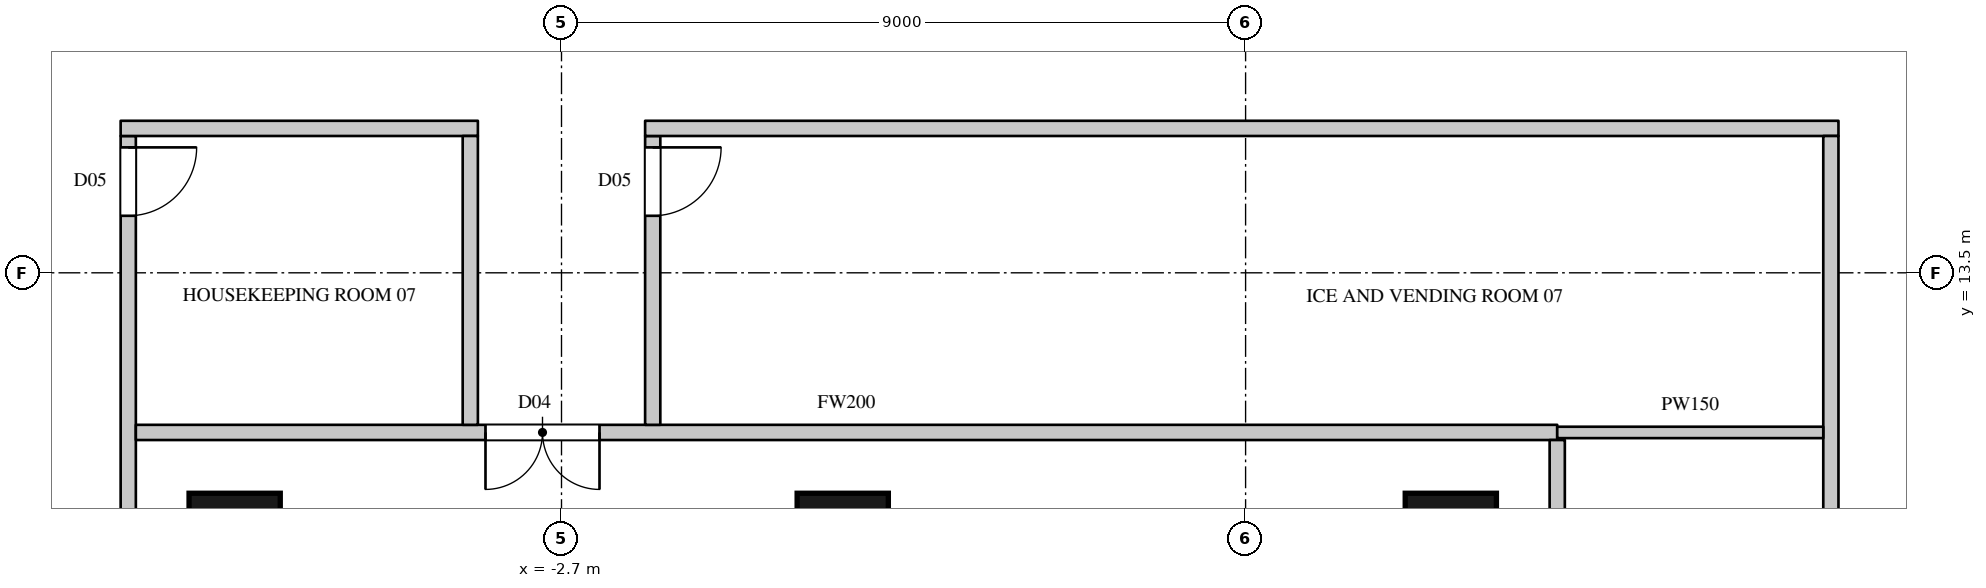
"""IFC4 building model, lengths in metres.
Left out: names, types, materials, properties, quantities, classifications, styles, units other than length and angle.
Written with IfcOpenShell. Run it as: python <this file> out.ifc"""

import sys

from ifc_helpers import new_model, si_unit, direction, frame, frame_2d, origin, origin_2d, place, context, subcontext, project, spatial, rectangle, circle, extrude, element, fill, save


model = new_model("IFC4")
c1 = context("Model", 3, precision=1e-05, world=origin(), true_north=direction((0.0, 1.0)))
c2 = subcontext(c1, "Body", "Model", "MODEL_VIEW")
j1 = project(units=[si_unit("LENGTHUNIT", "METRE"), si_unit("PLANEANGLEUNIT", "RADIAN")], contexts=[c1])
p1 = place(None, origin())
s1 = spatial("IfcSite", under=j1, at=p1, CompositionType="ELEMENT")
p2 = place(p1, origin())
s2 = spatial("IfcBuilding", under=s1, at=p2, CompositionType="ELEMENT")
p3 = place(p2, frame((0.0, 0.0, 55.5)))
s3 = spatial("IfcBuildingStorey", under=s2, at=p3, CompositionType="ELEMENT", Elevation=55.5)
for number, where, z_axis, x_axis in (
    (1, (-7.0, 10.0, 0.0), (0.0, 0.0, 1.0), (1.0, 0.0, 0.0)),
    (2, (1.0, 10.0, 0.0), (0.0, 0.0, 1.0), (1.0, 0.0, 0.0)),
    (3, (9.0, 10.0, 0.0), (0.0, 0.0, 1.0), (1.0, 0.0, 0.0)),
):
    element("IfcColumn", number, at=place(p3, frame(where, z_axis=z_axis, x_axis=x_axis)), inside=s3, PredefinedType="COLUMN", context=c2, shape_type="SweptSolid", body=[
        extrude(circle(Radius=0.6, at=origin_2d()), origin(), (0.0, 0.0, 1.0), 3.6),
    ])
p4 = place(p3, frame((-8.4, -15.3, 0.0), z_axis=(0.0, 0.0, 1.0), x_axis=(0.0, 1.0, 0.0)))
e4 = element("IfcWall", 4, at=p4, inside=s3, PredefinedType="PARTITIONING", context=c2, shape_type="SweptSolid", body=[
    extrude(rectangle(XDim=30.6, YDim=0.2, at=frame_2d((15.3, 0.0))), origin(), (0.0, 0.0, 1.0), 3.3),
])
p5 = place(p4, frame((19.05, 0.0, 0.0)))
e5 = element("IfcOpeningElement", 5, at=p5, cuts=e4, PredefinedType="OPENING", context=c2, shape_type="SweptSolid", body=[
    extrude(rectangle(XDim=1.5, YDim=2.2, at=frame_2d((0.75, 1.1))), frame((0.0, 0.11, 0.0), z_axis=(0.0, -1.0, 0.0), x_axis=(1.0, 0.0, 0.0)), (0.0, 0.0, 1.0), 0.22),
])
p6 = place(p4, frame((29.55, 0.0, 0.0)))
e6 = element("IfcOpeningElement", 6, at=p6, cuts=e4, PredefinedType="OPENING", context=c2, shape_type="SweptSolid", body=[
    extrude(rectangle(XDim=0.9, YDim=2.2, at=frame_2d((0.45, 1.1))), frame((0.0, 0.11, 0.0), z_axis=(0.0, -1.0, 0.0), x_axis=(1.0, 0.0, 0.0)), (0.0, 0.0, 1.0), 0.22),
])
p7 = place(p4, frame((0.15, 0.0, 0.0)))
e7 = element("IfcOpeningElement", 7, at=p7, cuts=e4, PredefinedType="OPENING", context=c2, shape_type="SweptSolid", body=[
    extrude(rectangle(XDim=0.9, YDim=2.2, at=frame_2d((0.45, 1.1))), frame((0.0, 0.11, 0.0), z_axis=(0.0, -1.0, 0.0), x_axis=(1.0, 0.0, 0.0)), (0.0, 0.0, 1.0), 0.22),
])
p8 = place(p3, frame((-8.3, 11.4, 0.0), z_axis=(0.0, 0.0, 1.0), x_axis=(1.0, 0.0, 0.0)))
e8 = element("IfcWall", 8, at=p8, inside=s3, PredefinedType="PARTITIONING", context=c2, shape_type="SweptSolid", body=[
    extrude(rectangle(XDim=18.7, YDim=0.2, at=frame_2d((9.35, 0.0))), origin(), (0.0, 0.0, 1.0), 3.3),
])
p9 = place(p8, frame((4.6, 0.0, 0.0)))
e9 = element("IfcOpeningElement", 9, at=p9, cuts=e8, PredefinedType="OPENING", context=c2, shape_type="SweptSolid", body=[
    extrude(rectangle(XDim=1.5, YDim=2.2, at=frame_2d((0.75, 1.1))), frame((0.0, 0.11, 0.0), z_axis=(0.0, -1.0, 0.0), x_axis=(1.0, 0.0, 0.0)), (0.0, 0.0, 1.0), 0.22),
])
p10 = place(p3, frame((-8.5, 15.4, 0.0), z_axis=(0.0, 0.0, 1.0), x_axis=(1.0, 0.0, 0.0)))
e10 = element("IfcWall", 10, at=p10, inside=s3, PredefinedType="PARTITIONING", context=c2, shape_type="SweptSolid", body=[
    extrude(rectangle(XDim=4.7, YDim=0.2, at=frame_2d((2.35, 0.0))), origin(), (0.0, 0.0, 1.0), 3.3),
])
p11 = place(p3, frame((-3.9, 11.5, 0.0), z_axis=(0.0, 0.0, 1.0), x_axis=(0.0, 1.0, 0.0)))
e11 = element("IfcWall", 11, at=p11, inside=s3, PredefinedType="PARTITIONING", context=c2, shape_type="SweptSolid", body=[
    extrude(rectangle(XDim=3.8, YDim=0.2, at=frame_2d((1.9, 0.0))), origin(), (0.0, 0.0, 1.0), 3.3),
])
p12 = place(p3, frame((-1.5, 11.5, 0.0), z_axis=(0.0, 0.0, 1.0), x_axis=(0.0, 1.0, 0.0)))
e12 = element("IfcWall", 12, at=p12, inside=s3, PredefinedType="PARTITIONING", context=c2, shape_type="SweptSolid", body=[
    extrude(rectangle(XDim=3.8, YDim=0.2, at=frame_2d((1.9, 0.0))), origin(), (0.0, 0.0, 1.0), 3.3),
])
p13 = place(p12, frame((2.75, 0.0, 0.0)))
e13 = element("IfcOpeningElement", 13, at=p13, cuts=e12, PredefinedType="OPENING", context=c2, shape_type="SweptSolid", body=[
    extrude(rectangle(XDim=0.9, YDim=2.2, at=frame_2d((0.45, 1.1))), frame((0.0, 0.11, 0.0), z_axis=(0.0, -1.0, 0.0), x_axis=(1.0, 0.0, 0.0)), (0.0, 0.0, 1.0), 0.22),
])
p14 = place(p3, frame((-1.6, 15.4, 0.0), z_axis=(0.0, 0.0, 1.0), x_axis=(1.0, 0.0, 0.0)))
e14 = element("IfcWall", 14, at=p14, inside=s3, PredefinedType="PARTITIONING", context=c2, shape_type="SweptSolid", body=[
    extrude(rectangle(XDim=15.7, YDim=0.2, at=frame_2d((7.85, 0.0))), origin(), (0.0, 0.0, 1.0), 3.3),
])
p15 = place(p3, frame((10.4, -11.3, 0.0), z_axis=(0.0, 0.0, 1.0), x_axis=(0.0, 1.0, 0.0)))
e15 = element("IfcWall", 15, at=p15, inside=s3, PredefinedType="PARTITIONING", context=c2, shape_type="SweptSolid", body=[
    extrude(rectangle(XDim=22.6, YDim=0.2, at=frame_2d((11.3, 0.0))), origin(), (0.0, 0.0, 1.0), 3.3),
])
p16 = place(p15, frame((4.8, 0.0, 0.0)))
e16 = element("IfcOpeningElement", 16, at=p16, cuts=e15, PredefinedType="OPENING", context=c2, shape_type="SweptSolid", body=[
    extrude(rectangle(XDim=1.5, YDim=2.2, at=frame_2d((0.75, 1.1))), frame((0.0, 0.11, 0.0), z_axis=(0.0, -1.0, 0.0), x_axis=(1.0, 0.0, 0.0)), (0.0, 0.0, 1.0), 0.22),
])
p17 = place(p15, frame((16.3, 0.0, 0.0)))
e17 = element("IfcOpeningElement", 17, at=p17, cuts=e15, PredefinedType="OPENING", context=c2, shape_type="SweptSolid", body=[
    extrude(rectangle(XDim=1.5, YDim=2.2, at=frame_2d((0.75, 1.1))), frame((0.0, 0.11, 0.0), z_axis=(0.0, -1.0, 0.0), x_axis=(1.0, 0.0, 0.0)), (0.0, 0.0, 1.0), 0.22),
])
p18 = place(p15, frame((11.95, 0.0, 0.0)))
e18 = element("IfcOpeningElement", 18, at=p18, cuts=e15, PredefinedType="OPENING", context=c2, shape_type="SweptSolid", body=[
    extrude(rectangle(XDim=1.5, YDim=2.2, at=frame_2d((0.75, 1.1))), frame((0.0, 0.11, 0.0), z_axis=(0.0, -1.0, 0.0), x_axis=(1.0, 0.0, 0.0)), (0.0, 0.0, 1.0), 0.22),
])
p19 = place(p3, frame((14.0, 6.825, 0.0), z_axis=(0.0, 0.0, 1.0), x_axis=(0.0, 1.0, 0.0)))
e19 = element("IfcWall", 19, at=p19, inside=s3, PredefinedType="PARTITIONING", context=c2, shape_type="SweptSolid", body=[
    extrude(rectangle(XDim=8.475, YDim=0.2, at=frame_2d((4.238, 0.0))), origin(), (0.0, 0.0, 1.0), 3.3),
])
p20 = place(p3, frame((10.4, 11.4, 0.0), z_axis=(0.0, 0.0, 1.0), x_axis=(1.0, 0.0, 0.0)))
e20 = element("IfcWall", 20, at=p20, inside=s3, PredefinedType="PARTITIONING", context=c2, shape_type="SweptSolid", body=[
    extrude(rectangle(XDim=3.5, YDim=0.15, at=frame_2d((1.75, 0.0))), origin(), (0.0, 0.0, 1.0), 3.3),
])
p21 = place(p9, origin())
e21 = element("IfcDoor", 21, at=p21, inside=s3, OperationType="DOUBLE_DOOR_SINGLE_SWING", PredefinedType="DOOR", context=c2, shape_type="SweptSolid", body=[
    extrude(rectangle(XDim=1.5, YDim=2.2, at=frame_2d((0.75, 1.1))), frame((0.0, 0.025, 0.0), z_axis=(0.0, -1.0, 0.0), x_axis=(1.0, 0.0, 0.0)), (0.0, 0.0, 1.0), 0.05),
])
fill(e9, e21)
p22 = place(p6, origin())
e22 = element("IfcDoor", 22, at=p22, inside=s3, OperationType="SINGLE_SWING_LEFT", PredefinedType="DOOR", context=c2, shape_type="SweptSolid", body=[
    extrude(rectangle(XDim=0.9, YDim=2.2, at=frame_2d((0.45, 1.1))), frame((0.0, 0.025, 0.0), z_axis=(0.0, -1.0, 0.0), x_axis=(1.0, 0.0, 0.0)), (0.0, 0.0, 1.0), 0.05),
])
fill(e6, e22)
p23 = place(p13, origin())
e23 = element("IfcDoor", 23, at=p23, inside=s3, OperationType="SINGLE_SWING_LEFT", PredefinedType="DOOR", context=c2, shape_type="SweptSolid", body=[
    extrude(rectangle(XDim=0.9, YDim=2.2, at=frame_2d((0.45, 1.1))), frame((0.0, 0.025, 0.0), z_axis=(0.0, -1.0, 0.0), x_axis=(1.0, 0.0, 0.0)), (0.0, 0.0, 1.0), 0.05),
])
fill(e13, e23)
save(model, sys.argv[1])
